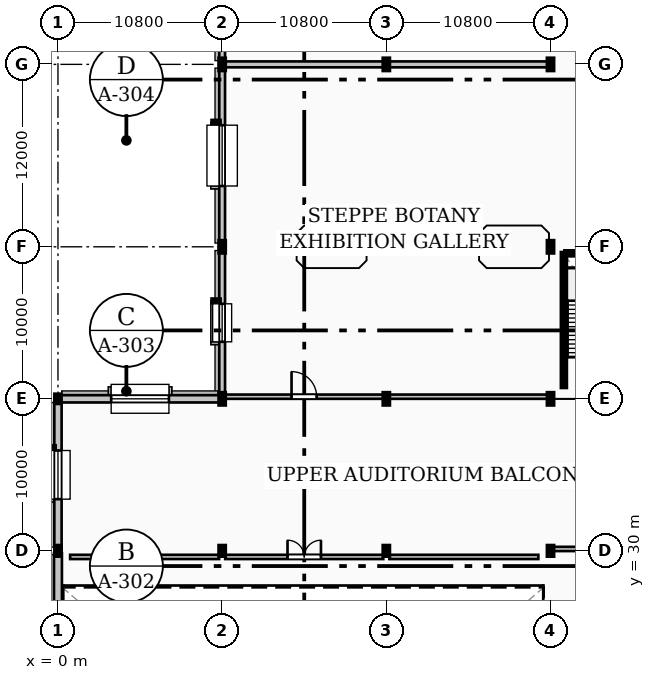
"""IFC4 building model, lengths in metres.
Left out: names, types, materials, properties, quantities, classifications, styles, units other than length and angle.
Written with IfcOpenShell. Run it as: python <this file> out.ifc"""

import sys

from ifc_helpers import new_model, si_unit, direction, frame, frame_2d, origin, origin_2d, place, context, subcontext, project, spatial, rectangle, i_section, extrude, element, fill, save


model = new_model("IFC4")
c1 = context("Model", 3, precision=1e-05, world=origin(), true_north=direction((0.0, 1.0)))
c2 = subcontext(c1, "Body", "Model", "MODEL_VIEW")
j1 = project(units=[si_unit("LENGTHUNIT", "METRE"), si_unit("PLANEANGLEUNIT", "RADIAN")], contexts=[c1])
p1 = place(None, origin())
s1 = spatial("IfcSite", under=j1, at=p1, CompositionType="ELEMENT")
p2 = place(p1, origin())
s2 = spatial("IfcBuilding", under=s1, at=p2, CompositionType="ELEMENT")
p3 = place(p2, frame((0.0, 0.0, 4.8)))
s3 = spatial("IfcBuildingStorey", under=s2, at=p3, CompositionType="ELEMENT", Elevation=4.8)
p4 = place(p3, frame((0.0, 30.0, 0.0), z_axis=(0.0, 0.0, 1.0), x_axis=(1.0, 0.0, 0.0)))
e1 = element("IfcColumn", 1, at=p4, inside=s3, PredefinedType="COLUMN", context=c2, shape_type="SweptSolid", body=[
    extrude(i_section(OverallWidth=0.3, OverallDepth=0.59, WebThickness=0.013, FlangeThickness=0.025, FilletRadius=0.027, at=origin_2d()), origin(), (0.0, 0.0, 1.0), 4.8),
])
p5 = place(p3, frame((0.0, 40.0, 0.0), z_axis=(0.0, 0.0, 1.0), x_axis=(1.0, 0.0, 0.0)))
e2 = element("IfcColumn", 2, at=p5, inside=s3, PredefinedType="COLUMN", context=c2, shape_type="SweptSolid", body=[
    extrude(i_section(OverallWidth=0.3, OverallDepth=0.5, WebThickness=0.014, FlangeThickness=0.028, FilletRadius=0.027, at=origin_2d()), origin(), (0.0, 0.0, 1.0), 4.8),
])
p6 = place(p3, frame((10.8, 30.0, 0.0), z_axis=(0.0, 0.0, 1.0), x_axis=(1.0, 0.0, 0.0)))
e3 = element("IfcColumn", 3, at=p6, inside=s3, PredefinedType="COLUMN", context=c2, shape_type="SweptSolid", body=[
    extrude(i_section(OverallWidth=0.3, OverallDepth=0.59, WebThickness=0.013, FlangeThickness=0.025, FilletRadius=0.027, at=origin_2d()), origin(), (0.0, 0.0, 1.0), 4.8),
])
for number, where, z_axis, x_axis in (
    (4, (10.8, 40.0, 0.0), (0.0, 0.0, 1.0), (1.0, 0.0, 0.0)),
    (5, (10.8, 50.0, 0.0), (0.0, 0.0, 1.0), (1.0, 0.0, 0.0)),
    (6, (10.8, 62.0, 0.0), (0.0, 0.0, 1.0), (1.0, 0.0, 0.0)),
):
    element("IfcColumn", number, at=place(p3, frame(where, z_axis=z_axis, x_axis=x_axis)), inside=s3, PredefinedType="COLUMN", context=c2, shape_type="SweptSolid", body=[
        extrude(i_section(OverallWidth=0.3, OverallDepth=0.7, WebThickness=0.017, FlangeThickness=0.032, FilletRadius=0.027, at=origin_2d()), origin(), (0.0, 0.0, 1.0), 4.8),
    ])
p7 = place(p3, frame((21.6, 30.0, 0.0), z_axis=(0.0, 0.0, 1.0), x_axis=(1.0, 0.0, 0.0)))
e7 = element("IfcColumn", 7, at=p7, inside=s3, PredefinedType="COLUMN", context=c2, shape_type="SweptSolid", body=[
    extrude(i_section(OverallWidth=0.3, OverallDepth=0.59, WebThickness=0.013, FlangeThickness=0.025, FilletRadius=0.027, at=origin_2d()), origin(), (0.0, 0.0, 1.0), 4.8),
])
for number, where, z_axis, x_axis in (
    (8, (21.6, 40.0, 0.0), (0.0, 0.0, 1.0), (1.0, 0.0, 0.0)),
    (9, (21.6, 50.0, 0.0), (0.0, 0.0, 1.0), (1.0, 0.0, 0.0)),
    (10, (21.6, 62.0, 0.0), (0.0, 0.0, 1.0), (1.0, 0.0, 0.0)),
):
    element("IfcColumn", number, at=place(p3, frame(where, z_axis=z_axis, x_axis=x_axis)), inside=s3, PredefinedType="COLUMN", context=c2, shape_type="SweptSolid", body=[
        extrude(i_section(OverallWidth=0.3, OverallDepth=0.7, WebThickness=0.017, FlangeThickness=0.032, FilletRadius=0.027, at=origin_2d()), origin(), (0.0, 0.0, 1.0), 4.8),
    ])
p8 = place(p3, frame((32.4, 30.0, 0.0), z_axis=(0.0, 0.0, 1.0), x_axis=(1.0, 0.0, 0.0)))
e11 = element("IfcColumn", 11, at=p8, inside=s3, PredefinedType="COLUMN", context=c2, shape_type="SweptSolid", body=[
    extrude(i_section(OverallWidth=0.3, OverallDepth=0.59, WebThickness=0.013, FlangeThickness=0.025, FilletRadius=0.027, at=origin_2d()), origin(), (0.0, 0.0, 1.0), 4.8),
])
for number, where, z_axis, x_axis in (
    (12, (32.4, 40.0, 0.0), (0.0, 0.0, 1.0), (1.0, 0.0, 0.0)),
    (13, (32.4, 50.0, 0.0), (0.0, 0.0, 1.0), (1.0, 0.0, 0.0)),
    (14, (32.4, 62.0, 0.0), (0.0, 0.0, 1.0), (1.0, 0.0, 0.0)),
):
    element("IfcColumn", number, at=place(p3, frame(where, z_axis=z_axis, x_axis=x_axis)), inside=s3, PredefinedType="COLUMN", context=c2, shape_type="SweptSolid", body=[
        extrude(i_section(OverallWidth=0.3, OverallDepth=0.7, WebThickness=0.017, FlangeThickness=0.032, FilletRadius=0.027, at=origin_2d()), origin(), (0.0, 0.0, 1.0), 4.8),
    ])
p9 = place(p3, frame((0.0, 39.855, 0.0), z_axis=(0.0, 0.0, 1.0), x_axis=(0.0, -1.0, 0.0)))
e15 = element("IfcWall", 15, at=p9, inside=s3, PredefinedType="STANDARD", context=c2, shape_type="SweptSolid", body=[
    extrude(rectangle(XDim=9.71, YDim=0.48, at=frame_2d((4.855, 0.0))), origin(), (0.0, 0.0, 1.0), 4.13),
])
p10 = place(p9, frame((3.255, 0.0, 1.0)))
e16 = element("IfcOpeningElement", 16, at=p10, cuts=e15, PredefinedType="OPENING", context=c2, shape_type="SweptSolid", body=[
    extrude(rectangle(XDim=3.2, YDim=2.2, at=frame_2d((1.6, 1.1))), frame((0.0, 0.25, 0.0), z_axis=(0.0, -1.0, 0.0), x_axis=(1.0, 0.0, 0.0)), (0.0, 0.0, 1.0), 0.5),
])
p11 = place(p3, frame((0.0, 29.855, 0.0), z_axis=(0.0, 0.0, 1.0), x_axis=(0.0, -1.0, 0.0)))
e17 = element("IfcWall", 17, at=p11, inside=s3, PredefinedType="SOLIDWALL", context=c2, shape_type="SweptSolid", body=[
    extrude(rectangle(XDim=9.71, YDim=0.52, at=frame_2d((4.855, 0.0))), origin(), (0.0, 0.0, 1.0), 4.359),
])
p12 = place(p3, frame((10.8, 71.855, 0.0), z_axis=(0.0, 0.0, 1.0), x_axis=(0.0, -1.0, 0.0)))
e18 = element("IfcWall", 18, at=p12, inside=s3, PredefinedType="STANDARD", context=c2, shape_type="SweptSolid", body=[
    extrude(rectangle(XDim=9.71, YDim=0.38, at=frame_2d((4.855, 0.0))), origin(), (0.0, 0.0, 1.0), 4.04),
])
p13 = place(p12, frame((3.705, 0.0, 1.0)))
e19 = element("IfcOpeningElement", 19, at=p13, cuts=e18, PredefinedType="OPENING", context=c2, shape_type="SweptSolid", body=[
    extrude(rectangle(XDim=2.3, YDim=2.3, at=frame_2d((1.15, 1.15))), frame((0.0, 0.2, 0.0), z_axis=(0.0, -1.0, 0.0), x_axis=(1.0, 0.0, 0.0)), (0.0, 0.0, 1.0), 0.4),
])
p14 = place(p3, frame((10.8, 61.855, 0.0), z_axis=(0.0, 0.0, 1.0), x_axis=(0.0, -1.0, 0.0)))
e20 = element("IfcWall", 20, at=p14, inside=s3, PredefinedType="STANDARD", context=c2, shape_type="SweptSolid", body=[
    extrude(rectangle(XDim=11.71, YDim=0.38, at=frame_2d((5.855, 0.0))), origin(), (0.0, 0.0, 1.0), 3.939),
])
p15 = place(p14, frame((3.855, 0.0, 1.0)))
e21 = element("IfcOpeningElement", 21, at=p15, cuts=e20, PredefinedType="OPENING", context=c2, shape_type="SweptSolid", body=[
    extrude(rectangle(XDim=4.0, YDim=2.6, at=frame_2d((2.0, 1.3))), frame((0.0, 0.2, 0.0), z_axis=(0.0, -1.0, 0.0), x_axis=(1.0, 0.0, 0.0)), (0.0, 0.0, 1.0), 0.4),
])
p16 = place(p3, frame((10.8, 49.855, 0.0), z_axis=(0.0, 0.0, 1.0), x_axis=(0.0, -1.0, 0.0)))
e22 = element("IfcWall", 22, at=p16, inside=s3, PredefinedType="STANDARD", context=c2, shape_type="SweptSolid", body=[
    extrude(rectangle(XDim=9.71, YDim=0.38, at=frame_2d((4.855, 0.0))), origin(), (0.0, 0.0, 1.0), 4.04),
])
p17 = place(p16, frame((3.605, 0.0, 1.0)))
e23 = element("IfcOpeningElement", 23, at=p17, cuts=e22, PredefinedType="OPENING", context=c2, shape_type="SweptSolid", body=[
    extrude(rectangle(XDim=2.5, YDim=1.7, at=frame_2d((1.25, 0.85))), frame((0.0, 0.2, 0.0), z_axis=(0.0, -1.0, 0.0), x_axis=(1.0, 0.0, 0.0)), (0.0, 0.0, 1.0), 0.4),
])
p18 = place(p3, frame((10.655, 40.0, 0.0), z_axis=(0.0, 0.0, 1.0), x_axis=(-1.0, 0.0, 0.0)))
e24 = element("IfcWall", 24, at=p18, inside=s3, PredefinedType="STANDARD", context=c2, shape_type="SweptSolid", body=[
    extrude(rectangle(XDim=10.51, YDim=0.48, at=frame_2d((5.255, 0.0))), origin(), (0.0, 0.0, 1.0), 3.939),
])
p19 = place(p18, frame((3.355, 0.0, 1.0)))
e25 = element("IfcOpeningElement", 25, at=p19, cuts=e24, PredefinedType="OPENING", context=c2, shape_type="SweptSolid", body=[
    extrude(rectangle(XDim=3.8, YDim=2.1, at=frame_2d((1.9, 1.05))), frame((0.0, 0.25, 0.0), z_axis=(0.0, -1.0, 0.0), x_axis=(1.0, 0.0, 0.0)), (0.0, 0.0, 1.0), 0.5),
])
p20 = place(p3, frame((33.28, 40.8, 0.0), z_axis=(0.0, 0.0, 1.0), x_axis=(0.0, 1.0, 0.0)))
e26 = element("IfcWall", 26, at=p20, inside=s3, PredefinedType="SHEAR", context=c2, shape_type="SweptSolid", body=[
    extrude(rectangle(XDim=8.77, YDim=0.22, at=frame_2d((4.385, 0.0))), origin(), (0.0, 0.0, 1.0), 4.56),
])
p21 = place(p3, frame((33.4, 49.57, 0.0), z_axis=(0.0, 0.0, 1.0), x_axis=(1.0, 0.0, 0.0)))
e27 = element("IfcWall", 27, at=p21, inside=s3, PredefinedType="SHEAR", context=c2, shape_type="SweptSolid", body=[
    extrude(rectangle(XDim=4.4, YDim=0.22, at=frame_2d((2.2, 0.0))), origin(), (0.0, 0.0, 1.0), 4.56),
])
p22 = place(p3, frame((0.8, 29.6, 0.0), z_axis=(0.0, 0.0, 1.0), x_axis=(1.0, 0.0, 0.0)))
e28 = element("IfcWall", 28, at=p22, inside=s3, PredefinedType="SOLIDWALL", context=c2, shape_type="SweptSolid", body=[
    extrude(rectangle(XDim=9.8, YDim=0.28, at=frame_2d((4.9, 0.0))), origin(), (0.0, 0.0, 1.0), 4.52),
])
p23 = place(p3, frame((11.0, 29.6, 0.0), z_axis=(0.0, 0.0, 1.0), x_axis=(1.0, 0.0, 0.0)))
e29 = element("IfcWall", 29, at=p23, inside=s3, PredefinedType="SOLIDWALL", context=c2, shape_type="SweptSolid", body=[
    extrude(rectangle(XDim=10.4, YDim=0.28, at=frame_2d((5.2, 0.0))), origin(), (0.0, 0.0, 1.0), 4.52),
])
p24 = place(p23, frame((4.1, 0.0, 0.0)))
e30 = element("IfcOpeningElement", 30, at=p24, cuts=e29, PredefinedType="OPENING", context=c2, shape_type="SweptSolid", body=[
    extrude(rectangle(XDim=2.2, YDim=2.5, at=frame_2d((1.1, 1.25))), frame((0.0, 0.15, 0.0), z_axis=(0.0, -1.0, 0.0), x_axis=(1.0, 0.0, 0.0)), (0.0, 0.0, 1.0), 0.3),
])
p25 = place(p3, frame((21.8, 29.6, 0.0), z_axis=(0.0, 0.0, 1.0), x_axis=(1.0, 0.0, 0.0)))
e31 = element("IfcWall", 31, at=p25, inside=s3, PredefinedType="SOLIDWALL", context=c2, shape_type="SweptSolid", body=[
    extrude(rectangle(XDim=9.8, YDim=0.28, at=frame_2d((4.9, 0.0))), origin(), (0.0, 0.0, 1.0), 4.52),
])
p26 = place(p3, frame((32.6, 30.125, 0.0), z_axis=(0.0, 0.0, 1.0), x_axis=(1.0, 0.0, 0.0)))
e32 = element("IfcWall", 32, at=p26, inside=s3, PredefinedType="SOLIDWALL", context=c2, shape_type="SweptSolid", body=[
    extrude(rectangle(XDim=5.2, YDim=0.28, at=frame_2d((2.6, 0.0))), origin(), (0.0, 0.0, 1.0), 4.059),
])
p27 = place(p26, frame((1.5, 0.0, 0.0)))
e33 = element("IfcOpeningElement", 33, at=p27, cuts=e32, PredefinedType="OPENING", context=c2, shape_type="SweptSolid", body=[
    extrude(rectangle(XDim=2.2, YDim=2.5, at=frame_2d((1.1, 1.25))), frame((0.0, 0.15, 0.0), z_axis=(0.0, -1.0, 0.0), x_axis=(1.0, 0.0, 0.0)), (0.0, 0.0, 1.0), 0.3),
])
p28 = place(p3, frame((10.98, 40.14, 0.0), z_axis=(0.0, 0.0, 1.0), x_axis=(1.0, 0.0, 0.0)))
e34 = element("IfcWall", 34, at=p28, inside=s3, PredefinedType="SOLIDWALL", context=c2, shape_type="SweptSolid", body=[
    extrude(rectangle(XDim=10.42, YDim=0.28, at=frame_2d((5.21, 0.0))), origin(), (0.0, 0.0, 1.0), 3.939),
])
p29 = place(p28, frame((4.385, 0.0, 0.0)))
e35 = element("IfcOpeningElement", 35, at=p29, cuts=e34, PredefinedType="OPENING", context=c2, shape_type="SweptSolid", body=[
    extrude(rectangle(XDim=1.65, YDim=2.4, at=frame_2d((0.825, 1.2))), frame((0.0, 0.15, 0.0), z_axis=(0.0, -1.0, 0.0), x_axis=(1.0, 0.0, 0.0)), (0.0, 0.0, 1.0), 0.3),
])
p30 = place(p3, frame((21.8, 40.14, 0.0), z_axis=(0.0, 0.0, 1.0), x_axis=(1.0, 0.0, 0.0)))
e36 = element("IfcWall", 36, at=p30, inside=s3, PredefinedType="SOLIDWALL", context=c2, shape_type="SweptSolid", body=[
    extrude(rectangle(XDim=10.4, YDim=0.28, at=frame_2d((5.2, 0.0))), origin(), (0.0, 0.0, 1.0), 3.939),
])
p31 = place(p3, frame((10.98, 62.0, 0.0), z_axis=(0.0, 0.0, 1.0), x_axis=(1.0, 0.0, 0.0)))
e37 = element("IfcWall", 37, at=p31, inside=s3, PredefinedType="PARTITIONING", context=c2, shape_type="SweptSolid", body=[
    extrude(rectangle(XDim=10.42, YDim=0.39, at=frame_2d((5.21, 0.0))), origin(), (0.0, 0.0, 1.0), 3.939),
])
p32 = place(p3, frame((21.8, 62.0, 0.0), z_axis=(0.0, 0.0, 1.0), x_axis=(1.0, 0.0, 0.0)))
e38 = element("IfcWall", 38, at=p32, inside=s3, PredefinedType="PARTITIONING", context=c2, shape_type="SweptSolid", body=[
    extrude(rectangle(XDim=10.4, YDim=0.39, at=frame_2d((5.2, 0.0))), origin(), (0.0, 0.0, 1.0), 3.939),
])
p33 = place(p10, origin())
e39 = element("IfcWindow", 39, at=p33, inside=s3, PartitioningType="SINGLE_PANEL", PredefinedType="WINDOW", context=c2, shape_type="SweptSolid", body=[
    extrude(rectangle(XDim=3.2, YDim=2.2, at=frame_2d((1.6, 1.1))), frame((0.0, 0.03, 0.0), z_axis=(0.0, -1.0, 0.0), x_axis=(1.0, 0.0, 0.0)), (0.0, 0.0, 1.0), 0.06),
])
fill(e16, e39)
p34 = place(p15, origin())
e40 = element("IfcWindow", 40, at=p34, inside=s3, PartitioningType="SINGLE_PANEL", PredefinedType="WINDOW", context=c2, shape_type="SweptSolid", body=[
    extrude(rectangle(XDim=4.0, YDim=2.6, at=frame_2d((2.0, 1.3))), frame((0.0, 0.03, 0.0), z_axis=(0.0, -1.0, 0.0), x_axis=(1.0, 0.0, 0.0)), (0.0, 0.0, 1.0), 0.06),
])
fill(e21, e40)
p35 = place(p17, origin())
e41 = element("IfcWindow", 41, at=p35, inside=s3, PartitioningType="SINGLE_PANEL", PredefinedType="WINDOW", context=c2, shape_type="SweptSolid", body=[
    extrude(rectangle(XDim=2.5, YDim=1.7, at=frame_2d((1.25, 0.85))), frame((0.0, 0.03, 0.0), z_axis=(0.0, -1.0, 0.0), x_axis=(1.0, 0.0, 0.0)), (0.0, 0.0, 1.0), 0.06),
])
fill(e23, e41)
p36 = place(p19, origin())
e42 = element("IfcWindow", 42, at=p36, inside=s3, PartitioningType="SINGLE_PANEL", PredefinedType="WINDOW", context=c2, shape_type="SweptSolid", body=[
    extrude(rectangle(XDim=3.8, YDim=2.1, at=frame_2d((1.9, 1.05))), frame((0.0, 0.03, 0.0), z_axis=(0.0, -1.0, 0.0), x_axis=(1.0, 0.0, 0.0)), (0.0, 0.0, 1.0), 0.06),
])
fill(e25, e42)
p37 = place(p24, origin())
e43 = element("IfcDoor", 43, at=p37, inside=s3, OperationType="DOUBLE_DOOR_SINGLE_SWING", PredefinedType="DOOR", context=c2, shape_type="SweptSolid", body=[
    extrude(rectangle(XDim=2.2, YDim=2.5, at=frame_2d((1.1, 1.25))), frame((0.0, 0.025, 0.0), z_axis=(0.0, -1.0, 0.0), x_axis=(1.0, 0.0, 0.0)), (0.0, 0.0, 1.0), 0.05),
])
fill(e30, e43)
p38 = place(p29, origin())
e44 = element("IfcDoor", 44, at=p38, inside=s3, OperationType="SINGLE_SWING_LEFT", PredefinedType="DOOR", context=c2, shape_type="SweptSolid", body=[
    extrude(rectangle(XDim=1.65, YDim=2.4, at=frame_2d((0.825, 1.2))), frame((0.0, 0.025, 0.0), z_axis=(0.0, -1.0, 0.0), x_axis=(1.0, 0.0, 0.0)), (0.0, 0.0, 1.0), 0.05),
])
fill(e35, e44)
save(model, sys.argv[1])
